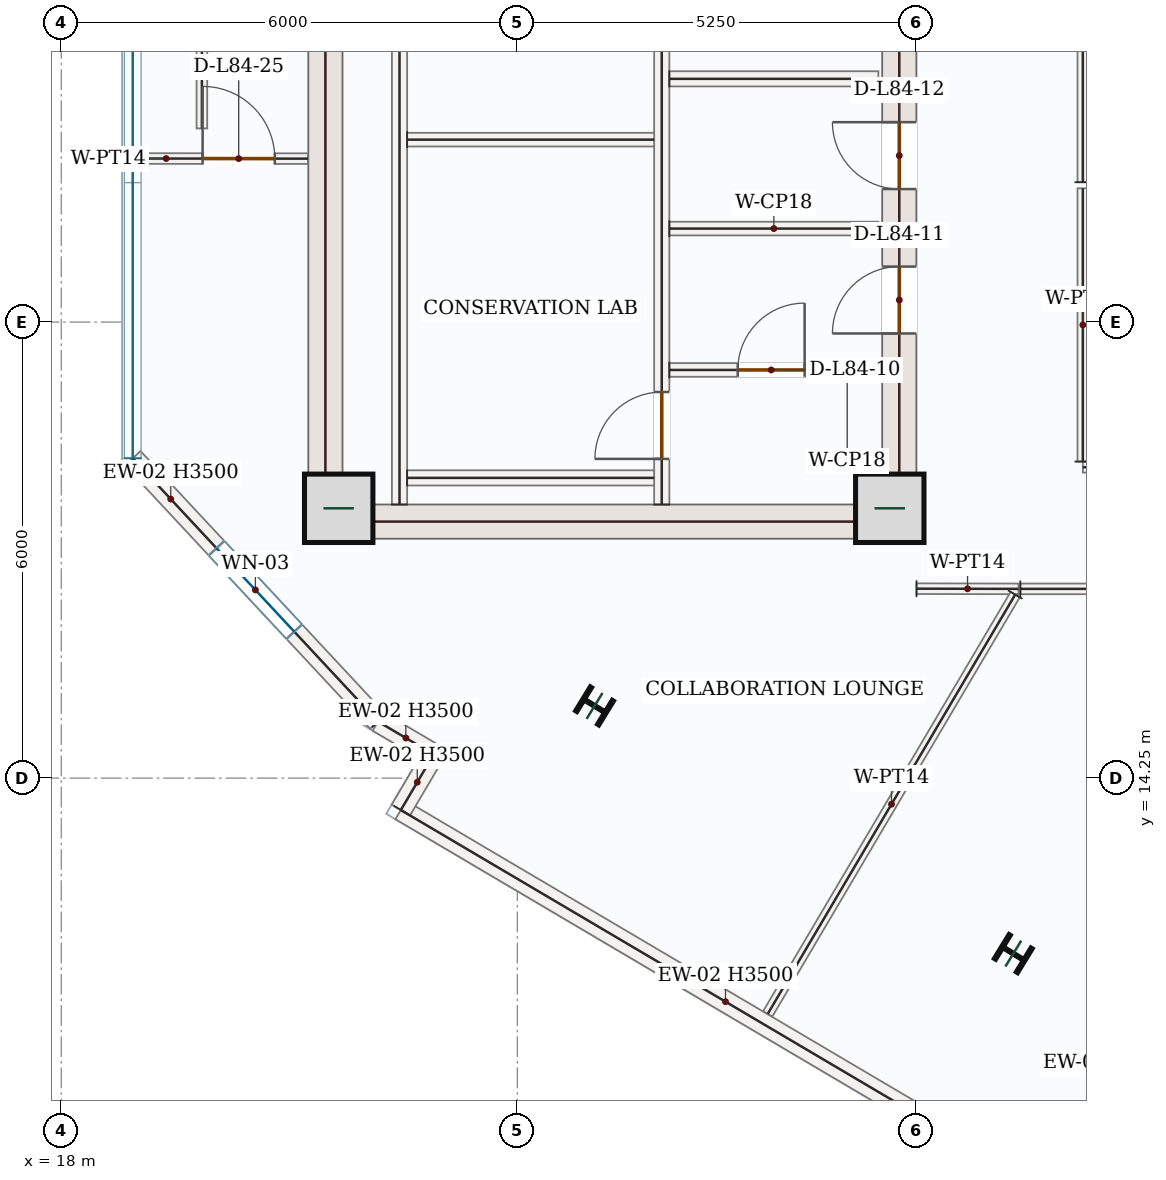
"""IFC4 building model, lengths in metres.
Left out: names, types, materials, properties, quantities, classifications, styles, units other than length and angle.
Written with IfcOpenShell. Run it as: python <this file> out.ifc"""

import sys

from ifc_helpers import new_model, si_unit, direction, frame, frame_2d, origin, origin_2d, place, context, subcontext, project, spatial, rectangle, i_section, extrude, source, transform, mapped, element, fill, save


model = new_model("IFC4")
c1 = context("Model", 3, precision=1e-05, world=origin(), true_north=direction((0.0, 1.0)))
c2 = subcontext(c1, "Body", "Model", "MODEL_VIEW")
j1 = project(units=[si_unit("LENGTHUNIT", "METRE"), si_unit("PLANEANGLEUNIT", "RADIAN")], contexts=[c1])
p1 = place(None, origin())
s1 = spatial("IfcSite", under=j1, at=p1, CompositionType="ELEMENT")
p2 = place(p1, origin())
s2 = spatial("IfcBuilding", under=s1, at=p2, CompositionType="ELEMENT")
p3 = place(p2, frame((0.0, 0.0, 346.05)))
s3 = spatial("IfcBuildingStorey", under=s2, at=p3, CompositionType="ELEMENT", Elevation=346.05)
m1 = source(origin(), c2, "Body", "SweptSolid", [
    extrude(rectangle(XDim=8.55, YDim=0.45, at=frame_2d((4.275, 0.0))), origin(), (0.0, 0.0, 1.0), 3.5),
])
p4 = place(p3, frame((21.475, 17.4, 0.0), z_axis=(0.0, 0.0, 1.0), x_axis=(0.0, 1.0, 0.0)))
e1 = element("IfcWall", 1, at=p4, inside=s3, PredefinedType="SHEAR", context=c2, shape_type="MappedRepresentation", body=[
    mapped(m1, transform((0.0, 0.0, 0.0), x_axis=(1.0, 0.0, 0.0), y_axis=(0.0, 1.0, 0.0), z_axis=(0.0, 0.0, 1.0), scale=1.0)),
])
p5 = place(p3, frame((29.025, 17.4, 0.0), z_axis=(0.0, 0.0, 1.0), x_axis=(0.0, 1.0, 0.0)))
e2 = element("IfcWall", 2, at=p5, inside=s3, PredefinedType="SHEAR", context=c2, shape_type="SweptSolid", body=[
    extrude(rectangle(XDim=8.55, YDim=0.45, at=frame_2d((4.275, 0.0))), origin(), (0.0, 0.0, 1.0), 3.5),
])
p6 = place(p5, frame((6.65, 0.0, 0.0)))
e3 = element("IfcOpeningElement", 3, at=p6, cuts=e2, PredefinedType="OPENING", context=c2, shape_type="SweptSolid", body=[
    extrude(rectangle(XDim=1.1, YDim=2.2, at=frame_2d((0.55, 1.1))), frame((0.0, 0.235, 0.0), z_axis=(0.0, -1.0, 0.0), x_axis=(1.0, 0.0, 0.0)), (0.0, 0.0, 1.0), 0.47),
])
p7 = place(p5, frame((2.7, 0.0, 0.0)))
e4 = element("IfcOpeningElement", 4, at=p7, cuts=e2, PredefinedType="OPENING", context=c2, shape_type="SweptSolid", body=[
    extrude(rectangle(XDim=0.88, YDim=2.1, at=frame_2d((0.44, 1.05))), frame((0.0, 0.235, 0.0), z_axis=(0.0, -1.0, 0.0), x_axis=(1.0, 0.0, 0.0)), (0.0, 0.0, 1.0), 0.47),
])
p8 = place(p5, frame((4.6, 0.0, 0.0)))
e5 = element("IfcOpeningElement", 5, at=p8, cuts=e2, PredefinedType="OPENING", context=c2, shape_type="SweptSolid", body=[
    extrude(rectangle(XDim=0.88, YDim=2.1, at=frame_2d((0.44, 1.05))), frame((0.0, 0.235, 0.0), z_axis=(0.0, -1.0, 0.0), x_axis=(1.0, 0.0, 0.0)), (0.0, 0.0, 1.0), 0.47),
])
m2 = source(origin(), c2, "Body", "SweptSolid", [
    extrude(rectangle(XDim=7.1, YDim=0.45, at=frame_2d((3.55, 0.0))), origin(), (0.0, 0.0, 1.0), 3.5),
])
p9 = place(p3, frame((21.7, 17.625, 0.0), z_axis=(0.0, 0.0, 1.0), x_axis=(1.0, 0.0, 0.0)))
e6 = element("IfcWall", 6, at=p9, inside=s3, PredefinedType="SHEAR", context=c2, shape_type="MappedRepresentation", body=[
    mapped(m2, transform((0.0, 0.0, 0.0), x_axis=(1.0, 0.0, 0.0), y_axis=(0.0, 1.0, 0.0), z_axis=(0.0, 0.0, 1.0), scale=1.0)),
])
m3 = source(origin(), c2, "Body", "SweptSolid", [
    extrude(rectangle(XDim=0.9, YDim=0.9, at=origin_2d()), origin(), (0.0, 0.0, 1.0), 3.75),
])
for number, where, z_axis, x_axis in (
    (7, (21.65, 17.8, 0.0), (0.0, 0.0, 1.0), (1.0, 0.0, 0.0)),
    (8, (28.9, 17.8, 0.0), (0.0, 0.0, 1.0), (1.0, 0.0, 0.0)),
):
    element("IfcColumn", number, at=place(p3, frame(where, z_axis=z_axis, x_axis=x_axis)), inside=s3, PredefinedType="COLUMN", context=c2, shape_type="MappedRepresentation", body=[
        mapped(m3, transform((0.0, 0.0, 0.0), x_axis=(1.0, 0.0, 0.0), y_axis=(0.0, 1.0, 0.0), z_axis=(0.0, 0.0, 1.0), scale=1.0)),
    ])
m4 = source(origin(), c2, "Body", "SweptSolid", [
    extrude(i_section(OverallWidth=0.369, OverallDepth=0.356, WebThickness=0.011, FlangeThickness=0.018, FilletRadius=0.018, at=origin_2d()), origin(), (0.0, 0.0, 1.0), 3.75),
])
for number, where, z_axis, x_axis in (
    (9, (25.016, 15.2, 0.0), (0.0, 0.0, 1.0), (0.522, 0.853, 0.0)),
    (10, (30.525, 11.942, 0.0), (0.0, 0.0, 1.0), (0.522, 0.853, 0.0)),
):
    element("IfcColumn", number, at=place(p3, frame(where, z_axis=z_axis, x_axis=x_axis)), inside=s3, PredefinedType="COLUMN", context=c2, shape_type="MappedRepresentation", body=[
        mapped(m4, transform((0.0, 0.0, 0.0), x_axis=(1.0, 0.0, 0.0), y_axis=(0.0, 1.0, 0.0), z_axis=(0.0, 0.0, 1.0), scale=1.0)),
    ])
m5 = source(origin(), c2, "Body", "SweptSolid", [
    extrude(rectangle(XDim=9.92, YDim=0.28, at=frame_2d((4.96, 0.0))), origin(), (0.0, 0.0, 1.0), 3.5),
])
p10 = place(p3, frame((31.01, 8.788, 0.0), z_axis=(0.0, 0.0, 1.0), x_axis=(-0.861192451778, 0.508279018848, 0.0)))
e11 = element("IfcWall", 11, at=p10, inside=s3, PredefinedType="SOLIDWALL", context=c2, shape_type="MappedRepresentation", body=[
    mapped(m5, transform((0.0, 0.0, 0.0), x_axis=(1.0, 0.0, 0.0), y_axis=(0.0, 1.0, 0.0), z_axis=(0.0, 0.0, 1.0), scale=1.0)),
])
m6 = source(origin(), c2, "Body", "SweptSolid", [
    extrude(rectangle(XDim=0.85, YDim=0.28, at=frame_2d((0.425, 0.0))), origin(), (0.0, 0.0, 1.0), 3.5),
])
for number, where, z_axis, x_axis in (
    (12, (22.467, 13.83, 0.0), (0.0, 0.0, 1.0), (0.508, 0.861, 0.0)),
    (13, (22.899, 14.562, 0.0), (0.0, 0.0, 1.0), (-0.861, 0.508, 0.0)),
):
    element("IfcWall", number, at=place(p3, frame(where, z_axis=z_axis, x_axis=x_axis)), inside=s3, PredefinedType="SOLIDWALL", context=c2, shape_type="MappedRepresentation", body=[
        mapped(m6, transform((0.0, 0.0, 0.0), x_axis=(1.0, 0.0, 0.0), y_axis=(0.0, 1.0, 0.0), z_axis=(0.0, 0.0, 1.0), scale=1.0)),
    ])
p11 = place(p3, frame((22.167, 14.994, 0.0), z_axis=(0.0, 0.0, 1.0), x_axis=(-0.681733754317, 0.731600361006, 0.0)))
e14 = element("IfcWall", 14, at=p11, inside=s3, PredefinedType="SOLIDWALL", context=c2, shape_type="SweptSolid", body=[
    extrude(rectangle(XDim=4.734, YDim=0.28, at=frame_2d((2.367, 0.0))), origin(), (0.0, 0.0, 1.0), 3.5),
])
p12 = place(p11, frame((1.617, 0.0, 0.85)))
e15 = element("IfcOpeningElement", 15, at=p12, cuts=e14, PredefinedType="OPENING", context=c2, shape_type="SweptSolid", body=[
    extrude(rectangle(XDim=1.5, YDim=1.5, at=frame_2d((0.75, 0.75))), frame((0.0, 0.15, 0.0), z_axis=(0.0, -1.0, 0.0), x_axis=(1.0, 0.0, 0.0)), (0.0, 0.0, 1.0), 0.3),
])
m7 = source(origin(), c2, "Body", "SweptSolid", [
    extrude(rectangle(XDim=7.87, YDim=0.2, at=frame_2d((3.935, 0.0))), origin(), (0.0, 0.0, 1.0), 3.5),
])
p13 = place(p3, frame((22.45, 17.85, 0.0), z_axis=(0.0, 0.0, 1.0), x_axis=(0.0, 1.0, 0.0)))
e16 = element("IfcWall", 16, at=p13, inside=s3, PredefinedType="SOLIDWALL", context=c2, shape_type="MappedRepresentation", body=[
    mapped(m7, transform((0.0, 0.0, 0.0), x_axis=(1.0, 0.0, 0.0), y_axis=(0.0, 1.0, 0.0), z_axis=(0.0, 0.0, 1.0), scale=1.0)),
])
p14 = place(p3, frame((25.9, 17.85, 0.0), z_axis=(0.0, 0.0, 1.0), x_axis=(0.0, 1.0, 0.0)))
e17 = element("IfcWall", 17, at=p14, inside=s3, PredefinedType="SOLIDWALL", context=c2, shape_type="SweptSolid", body=[
    extrude(rectangle(XDim=8.0, YDim=0.2, at=frame_2d((4.0, 0.0))), origin(), (0.0, 0.0, 1.0), 3.5),
])
p15 = place(p14, frame((6.2, 0.0, 0.0)))
e18 = element("IfcOpeningElement", 18, at=p15, cuts=e17, PredefinedType="OPENING", context=c2, shape_type="SweptSolid", body=[
    extrude(rectangle(XDim=1.0, YDim=2.15, at=frame_2d((0.5, 1.075))), frame((0.0, 0.11, 0.0), z_axis=(0.0, -1.0, 0.0), x_axis=(1.0, 0.0, 0.0)), (0.0, 0.0, 1.0), 0.22),
])
p16 = place(p14, frame((0.6, 0.0, 0.0)))
e19 = element("IfcOpeningElement", 19, at=p16, cuts=e17, PredefinedType="OPENING", context=c2, shape_type="SweptSolid", body=[
    extrude(rectangle(XDim=0.88, YDim=2.1, at=frame_2d((0.44, 1.05))), frame((0.0, 0.11, 0.0), z_axis=(0.0, -1.0, 0.0), x_axis=(1.0, 0.0, 0.0)), (0.0, 0.0, 1.0), 0.22),
])
m8 = source(origin(), c2, "Body", "SweptSolid", [
    extrude(rectangle(XDim=3.25, YDim=0.2, at=frame_2d((1.625, 0.0))), origin(), (0.0, 0.0, 1.0), 3.5),
])
p17 = place(p3, frame((22.55, 18.2, 0.0), z_axis=(0.0, 0.0, 1.0), x_axis=(1.0, 0.0, 0.0)))
e20 = element("IfcWall", 20, at=p17, inside=s3, PredefinedType="SOLIDWALL", context=c2, shape_type="MappedRepresentation", body=[
    mapped(m8, transform((0.0, 0.0, 0.0), x_axis=(1.0, 0.0, 0.0), y_axis=(0.0, 1.0, 0.0), z_axis=(0.0, 0.0, 1.0), scale=1.0)),
])
m9 = source(origin(), c2, "Body", "SweptSolid", [
    extrude(rectangle(XDim=3.25, YDim=0.18, at=frame_2d((1.625, 0.0))), origin(), (0.0, 0.0, 1.0), 3.5),
])
p18 = place(p3, frame((22.55, 22.65, 0.0), z_axis=(0.0, 0.0, 1.0), x_axis=(1.0, 0.0, 0.0)))
e21 = element("IfcWall", 21, at=p18, inside=s3, PredefinedType="PARTITIONING", context=c2, shape_type="MappedRepresentation", body=[
    mapped(m9, transform((0.0, 0.0, 0.0), x_axis=(1.0, 0.0, 0.0), y_axis=(0.0, 1.0, 0.0), z_axis=(0.0, 0.0, 1.0), scale=1.0)),
])
m10 = source(origin(), c2, "Body", "SweptSolid", [
    extrude(rectangle(XDim=2.75, YDim=0.2, at=frame_2d((1.375, 0.0))), origin(), (0.0, 0.0, 1.0), 3.5),
])
p19 = place(p3, frame((26.0, 23.45, 0.0), z_axis=(0.0, 0.0, 1.0), x_axis=(1.0, 0.0, 0.0)))
e22 = element("IfcWall", 22, at=p19, inside=s3, PredefinedType="SOLIDWALL", context=c2, shape_type="MappedRepresentation", body=[
    mapped(m10, transform((0.0, 0.0, 0.0), x_axis=(1.0, 0.0, 0.0), y_axis=(0.0, 1.0, 0.0), z_axis=(0.0, 0.0, 1.0), scale=1.0)),
])
p20 = place(p3, frame((26.0, 19.62, 0.0), z_axis=(0.0, 0.0, 1.0), x_axis=(1.0, 0.0, 0.0)))
e23 = element("IfcWall", 23, at=p20, inside=s3, PredefinedType="PARTITIONING", context=c2, shape_type="SweptSolid", body=[
    extrude(rectangle(XDim=2.75, YDim=0.18, at=frame_2d((1.375, 0.0))), origin(), (0.0, 0.0, 1.0), 3.5),
])
p21 = place(p20, frame((0.9, 0.0, 0.0)))
e24 = element("IfcOpeningElement", 24, at=p21, cuts=e23, PredefinedType="OPENING", context=c2, shape_type="SweptSolid", body=[
    extrude(rectangle(XDim=0.88, YDim=2.1, at=frame_2d((0.44, 1.05))), frame((0.0, 0.1, 0.0), z_axis=(0.0, -1.0, 0.0), x_axis=(1.0, 0.0, 0.0)), (0.0, 0.0, 1.0), 0.2),
])
m11 = source(origin(), c2, "Body", "SweptSolid", [
    extrude(rectangle(XDim=2.75, YDim=0.18, at=frame_2d((1.375, 0.0))), origin(), (0.0, 0.0, 1.0), 3.5),
])
p22 = place(p3, frame((26.0, 21.48, 0.0), z_axis=(0.0, 0.0, 1.0), x_axis=(1.0, 0.0, 0.0)))
e25 = element("IfcWall", 25, at=p22, inside=s3, PredefinedType="PARTITIONING", context=c2, shape_type="MappedRepresentation", body=[
    mapped(m11, transform((0.0, 0.0, 0.0), x_axis=(1.0, 0.0, 0.0), y_axis=(0.0, 1.0, 0.0), z_axis=(0.0, 0.0, 1.0), scale=1.0)),
])
p23 = place(p3, frame((35.91, 18.34, 0.0), z_axis=(0.0, 0.0, 1.0), x_axis=(-1.0, 0.0, 0.0)))
e26 = element("IfcWall", 26, at=p23, inside=s3, PredefinedType="PARTITIONING", context=c2, shape_type="SweptSolid", body=[
    extrude(rectangle(XDim=4.47, YDim=0.14, at=frame_2d((2.235, 0.0))), origin(), (0.0, 0.0, 1.0), 3.5),
])
p24 = place(p23, frame((0.774, 0.0, 0.0)))
e27 = element("IfcOpeningElement", 27, at=p24, cuts=e26, PredefinedType="OPENING", context=c2, shape_type="SweptSolid", body=[
    extrude(rectangle(XDim=0.95, YDim=2.15, at=frame_2d((0.475, 1.075))), frame((0.0, 0.08, 0.0), z_axis=(0.0, -1.0, 0.0), x_axis=(1.0, 0.0, 0.0)), (0.0, 0.0, 1.0), 0.16),
])
m12 = source(origin(), c2, "Body", "SweptSolid", [
    extrude(rectangle(XDim=3.595, YDim=0.14, at=frame_2d((1.797, 0.0))), origin(), (0.0, 0.0, 1.0), 3.5),
])
p25 = place(p3, frame((31.44, 18.415, 0.0), z_axis=(0.0, 0.0, 1.0), x_axis=(0.0, 1.0, 0.0)))
e28 = element("IfcWall", 28, at=p25, inside=s3, PredefinedType="PARTITIONING", context=c2, shape_type="MappedRepresentation", body=[
    mapped(m12, transform((0.0, 0.0, 0.0), x_axis=(1.0, 0.0, 0.0), y_axis=(0.0, 1.0, 0.0), z_axis=(0.0, 0.0, 1.0), scale=1.0)),
])
m13 = source(origin(), c2, "Body", "SweptSolid", [
    extrude(rectangle(XDim=3.72, YDim=0.14, at=frame_2d((1.86, 0.0))), origin(), (0.0, 0.0, 1.0), 3.5),
])
p26 = place(p3, frame((31.44, 22.09, 0.0), z_axis=(0.0, 0.0, 1.0), x_axis=(0.0, 1.0, 0.0)))
e29 = element("IfcWall", 29, at=p26, inside=s3, PredefinedType="PARTITIONING", context=c2, shape_type="MappedRepresentation", body=[
    mapped(m13, transform((0.0, 0.0, 0.0), x_axis=(1.0, 0.0, 0.0), y_axis=(0.0, 1.0, 0.0), z_axis=(0.0, 0.0, 1.0), scale=1.0)),
])
p27 = place(p3, frame((19.05, 22.402, 0.0), z_axis=(0.0, 0.0, 1.0), x_axis=(0.999999696925, -0.000778556098, 0.0)))
e30 = element("IfcWall", 30, at=p27, inside=s3, PredefinedType="PARTITIONING", context=c2, shape_type="SweptSolid", body=[
    extrude(rectangle(XDim=2.195, YDim=0.14, at=frame_2d((1.098, 0.0))), origin(), (0.0, 0.0, 1.0), 3.5),
])
p28 = place(p27, frame((0.809, 0.0, 0.0)))
e31 = element("IfcOpeningElement", 31, at=p28, cuts=e30, PredefinedType="OPENING", context=c2, shape_type="SweptSolid", body=[
    extrude(rectangle(XDim=0.95, YDim=2.15, at=frame_2d((0.475, 1.075))), frame((0.0, 0.08, 0.0), z_axis=(0.0, -1.0, 0.0), x_axis=(1.0, 0.0, 0.0)), (0.0, 0.0, 1.0), 0.16),
])
m14 = source(origin(), c2, "Body", "SweptSolid", [
    extrude(rectangle(XDim=1.343, YDim=0.14, at=frame_2d((0.671, 0.0))), origin(), (0.0, 0.0, 1.0), 3.5),
])
p29 = place(p3, frame((29.252, 16.743, 0.0), z_axis=(0.0, 0.0, 1.0), x_axis=(0.999997619843, -0.002181812989, 0.0)))
e32 = element("IfcWall", 32, at=p29, inside=s3, PredefinedType="PARTITIONING", context=c2, shape_type="MappedRepresentation", body=[
    mapped(m14, transform((0.0, 0.0, 0.0), x_axis=(1.0, 0.0, 0.0), y_axis=(0.0, 1.0, 0.0), z_axis=(0.0, 0.0, 1.0), scale=1.0)),
])
m15 = source(origin(), c2, "Body", "SweptSolid", [
    extrude(rectangle(XDim=6.405, YDim=0.14, at=frame_2d((3.202, 0.0))), origin(), (0.0, 0.0, 1.0), 3.5),
])
p30 = place(p3, frame((30.55, 16.665, 0.0), z_axis=(0.0, 0.0, 1.0), x_axis=(-0.508299006291, -0.861180654801, 0.0)))
e33 = element("IfcWall", 33, at=p30, inside=s3, PredefinedType="PARTITIONING", context=c2, shape_type="MappedRepresentation", body=[
    mapped(m15, transform((0.0, 0.0, 0.0), x_axis=(1.0, 0.0, 0.0), y_axis=(0.0, 1.0, 0.0), z_axis=(0.0, 0.0, 1.0), scale=1.0)),
])
p31 = place(p3, frame((30.618, 16.74, 0.0), z_axis=(0.0, 0.0, 1.0), x_axis=(1.0, 0.0, 0.0)))
e34 = element("IfcWall", 34, at=p31, inside=s3, PredefinedType="PARTITIONING", context=c2, shape_type="SweptSolid", body=[
    extrude(rectangle(XDim=8.014, YDim=0.14, at=frame_2d((4.007, 0.0))), origin(), (0.0, 0.0, 1.0), 3.5),
])
p32 = place(p31, frame((4.592, 0.0, 0.0)))
e35 = element("IfcOpeningElement", 35, at=p32, cuts=e34, PredefinedType="OPENING", context=c2, shape_type="SweptSolid", body=[
    extrude(rectangle(XDim=0.95, YDim=2.15, at=frame_2d((0.475, 1.075))), frame((0.0, 0.08, 0.0), z_axis=(0.0, -1.0, 0.0), x_axis=(1.0, 0.0, 0.0)), (0.0, 0.0, 1.0), 0.16),
])
p33 = place(p3, frame((19.853, 31.598, 0.0), z_axis=(0.0, 0.0, 1.0), x_axis=(-0.00027740789, -0.999999961522, 0.0)))
e36 = element("IfcWall", 36, at=p33, inside=s3, PredefinedType="PARTITIONING", context=c2, shape_type="SweptSolid", body=[
    extrude(rectangle(XDim=8.801, YDim=0.14, at=frame_2d((4.4, 0.0))), origin(), (0.0, 0.0, 1.0), 3.5),
])
p34 = place(p33, frame((5.103, 0.0, 0.0)))
e37 = element("IfcOpeningElement", 37, at=p34, cuts=e36, PredefinedType="OPENING", context=c2, shape_type="SweptSolid", body=[
    extrude(rectangle(XDim=0.95, YDim=2.15, at=frame_2d((0.475, 1.075))), frame((0.0, 0.08, 0.0), z_axis=(0.0, -1.0, 0.0), x_axis=(1.0, 0.0, 0.0)), (0.0, 0.0, 1.0), 0.16),
])
m16 = source(origin(), c2, "Body", "SweptSolid", [
    extrude(rectangle(XDim=1.5, YDim=1.5, at=frame_2d((0.75, 0.75))), frame((0.0, 0.03, 0.0), z_axis=(0.0, -1.0, 0.0), x_axis=(1.0, 0.0, 0.0)), (0.0, 0.0, 1.0), 0.06),
])
p35 = place(p12, origin())
e38 = element("IfcWindow", 38, at=p35, inside=s3, PartitioningType="SINGLE_PANEL", PredefinedType="WINDOW", context=c2, shape_type="MappedRepresentation", body=[
    mapped(m16, transform((0.0, 0.0, 0.0), x_axis=(1.0, 0.0, 0.0), y_axis=(0.0, 1.0, 0.0), z_axis=(0.0, 0.0, 1.0), scale=1.0)),
])
fill(e15, e38)
m17 = source(origin(), c2, "Body", "SweptSolid", [
    extrude(rectangle(XDim=0.88, YDim=2.1, at=frame_2d((0.44, 1.05))), frame((0.0, 0.025, 0.0), z_axis=(0.0, -1.0, 0.0), x_axis=(1.0, 0.0, 0.0)), (0.0, 0.0, 1.0), 0.05),
])
p36 = place(p16, origin())
e39 = element("IfcDoor", 39, at=p36, inside=s3, OperationType="SINGLE_SWING_LEFT", PredefinedType="DOOR", context=c2, shape_type="MappedRepresentation", body=[
    mapped(m17, transform((0.0, 0.0, 0.0), x_axis=(1.0, 0.0, 0.0), y_axis=(0.0, 1.0, 0.0), z_axis=(0.0, 0.0, 1.0), scale=1.0)),
])
fill(e19, e39)
p37 = place(p21, origin())
e40 = element("IfcDoor", 40, at=p37, inside=s3, OperationType="SINGLE_SWING_RIGHT", PredefinedType="DOOR", context=c2, shape_type="MappedRepresentation", body=[
    mapped(m17, transform((0.0, 0.0, 0.0), x_axis=(1.0, 0.0, 0.0), y_axis=(0.0, 1.0, 0.0), z_axis=(0.0, 0.0, 1.0), scale=1.0)),
])
fill(e24, e40)
p38 = place(p7, origin())
e41 = element("IfcDoor", 41, at=p38, inside=s3, OperationType="SINGLE_SWING_LEFT", PredefinedType="DOOR", context=c2, shape_type="MappedRepresentation", body=[
    mapped(m17, transform((0.0, 0.0, 0.0), x_axis=(1.0, 0.0, 0.0), y_axis=(0.0, 1.0, 0.0), z_axis=(0.0, 0.0, 1.0), scale=1.0)),
])
fill(e4, e41)
p39 = place(p8, origin())
e42 = element("IfcDoor", 42, at=p39, inside=s3, OperationType="SINGLE_SWING_RIGHT", PredefinedType="DOOR", context=c2, shape_type="MappedRepresentation", body=[
    mapped(m17, transform((0.0, 0.0, 0.0), x_axis=(1.0, 0.0, 0.0), y_axis=(0.0, 1.0, 0.0), z_axis=(0.0, 0.0, 1.0), scale=1.0)),
])
fill(e5, e42)
m18 = source(origin(), c2, "Body", "SweptSolid", [
    extrude(rectangle(XDim=0.95, YDim=2.15, at=frame_2d((0.475, 1.075))), frame((0.0, 0.025, 0.0), z_axis=(0.0, -1.0, 0.0), x_axis=(1.0, 0.0, 0.0)), (0.0, 0.0, 1.0), 0.05),
])
p40 = place(p28, origin())
e43 = element("IfcDoor", 43, at=p40, inside=s3, OperationType="SINGLE_SWING_LEFT", PredefinedType="DOOR", context=c2, shape_type="MappedRepresentation", body=[
    mapped(m18, transform((0.0, 0.0, 0.0), x_axis=(1.0, 0.0, 0.0), y_axis=(0.0, 1.0, 0.0), z_axis=(0.0, 0.0, 1.0), scale=1.0)),
])
fill(e31, e43)
save(model, sys.argv[1])
